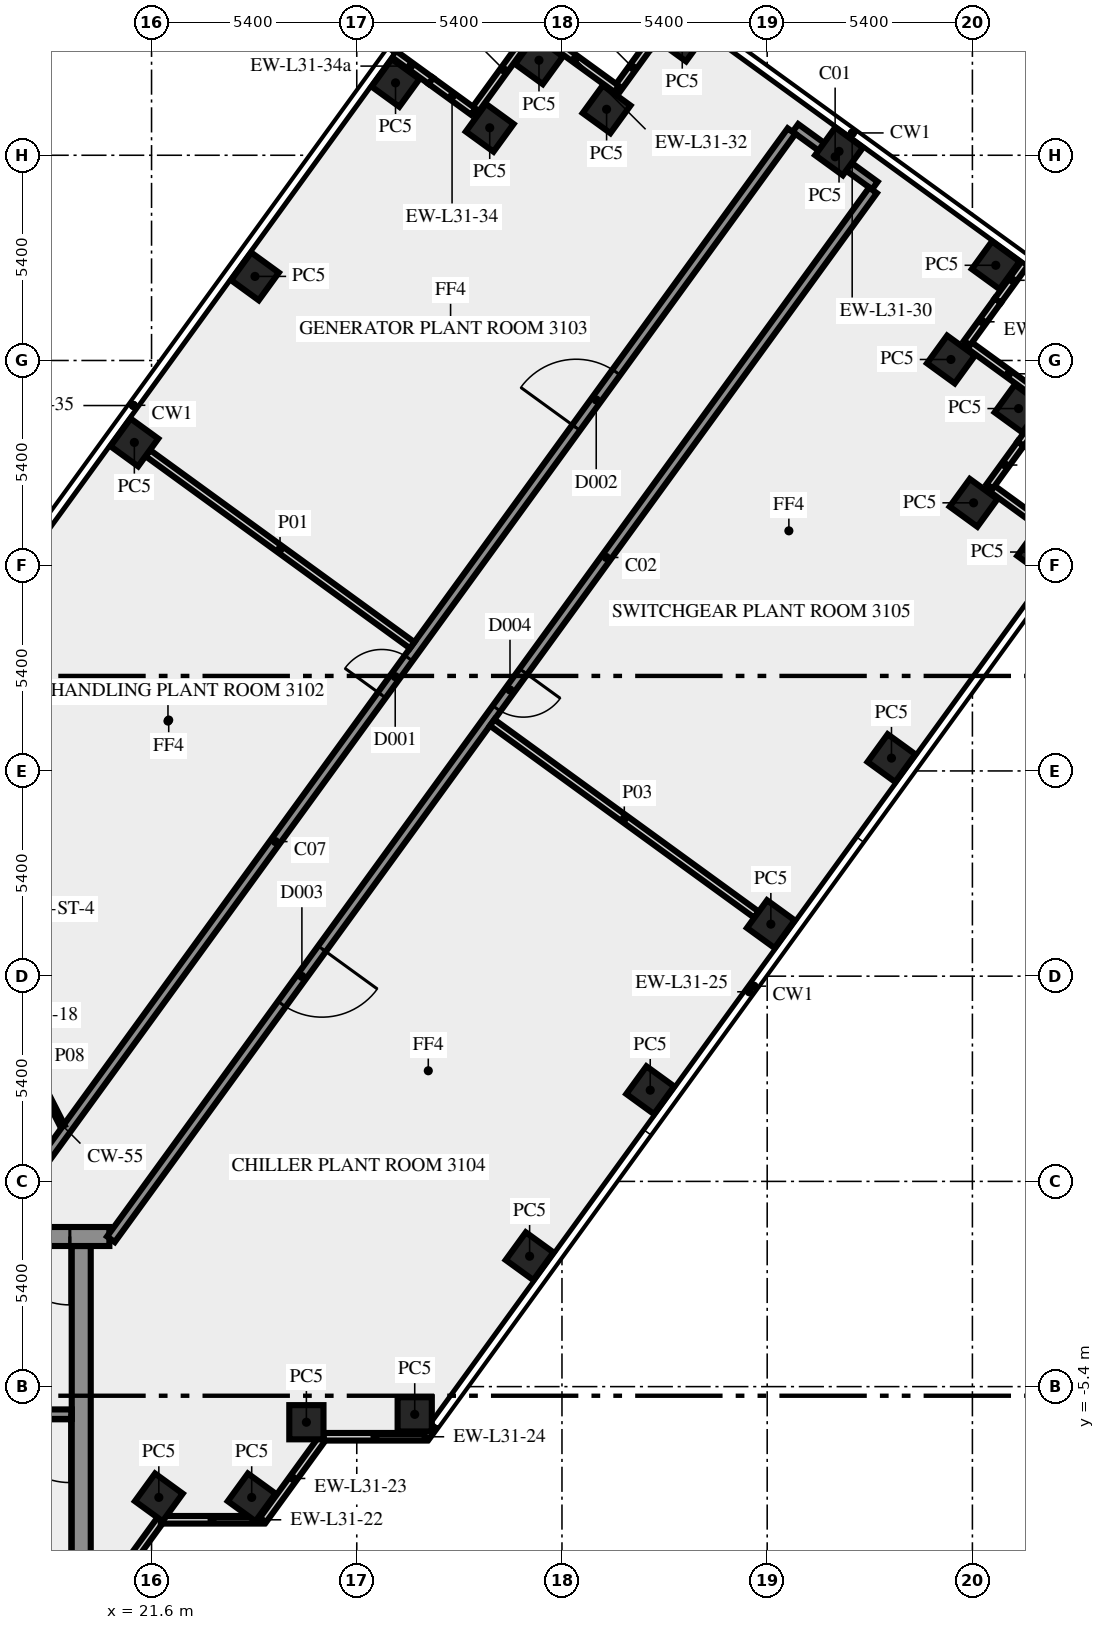
"""IFC4 building model, lengths in metres.
Left out: names, types, materials, properties, quantities, classifications, styles, units other than length and angle.
Written with IfcOpenShell. Run it as: python <this file> out.ifc"""

import sys

from ifc_helpers import new_model, si_unit, direction, frame, frame_2d, origin, origin_2d, place, context, subcontext, project, spatial, rectangle, extrude, element, fill, save


model = new_model("IFC4")
c1 = context("Model", 3, precision=1e-05, world=origin(), true_north=direction((0.0, 1.0)))
c2 = subcontext(c1, "Body", "Model", "MODEL_VIEW")
j1 = project(units=[si_unit("LENGTHUNIT", "METRE"), si_unit("PLANEANGLEUNIT", "RADIAN")], contexts=[c1])
p1 = place(None, origin())
s1 = spatial("IfcSite", under=j1, at=p1, CompositionType="ELEMENT")
p2 = place(p1, origin())
s2 = spatial("IfcBuilding", under=s1, at=p2, CompositionType="ELEMENT")
p3 = place(p2, frame((0.0, 0.0, 133.0)))
s3 = spatial("IfcBuildingStorey", under=s2, at=p3, CompositionType="ELEMENT", Elevation=133.0)
for number, where, z_axis, x_axis in (
    (1, (21.792, -8.315, 0.0), (0.0, 0.0, 1.0), (0.588, 0.809, 0.0)),
    (2, (24.235, -8.315, 0.0), (0.0, 0.0, 1.0), (0.588, 0.809, 0.0)),
    (3, (25.674, -6.337, 0.0), (0.0, 0.0, 1.0), (1.0, 0.0, 0.0)),
    (4, (28.525, -6.13, 0.0), (0.0, 0.0, 1.0), (1.0, 0.0, 0.0)),
    (5, (31.548, -1.969, 0.0), (0.0, 0.0, 1.0), (0.588, 0.809, 0.0)),
    (6, (34.722, 2.4, 0.0), (0.0, 0.0, 1.0), (0.588, 0.809, 0.0)),
    (7, (37.896, 6.769, 0.0), (0.0, 0.0, 1.0), (0.588, 0.809, 0.0)),
    (8, (41.07, 11.137, 0.0), (0.0, 0.0, 1.0), (0.588, 0.809, 0.0)),
    (9, (45.01, 16.56, 0.0), (0.0, 0.0, 1.0), (0.588, 0.809, 0.0)),
    (10, (43.231, 17.854, 0.0), (0.0, 0.0, 1.0), (0.588, 0.809, 0.0)),
    (11, (44.415, 20.335, 0.0), (0.0, 0.0, 1.0), (0.588, 0.809, 0.0)),
    (12, (42.635, 21.626, 0.0), (0.0, 0.0, 1.0), (-0.809, 0.588, 0.0)),
    (13, (43.815, 24.105, 0.0), (0.0, 0.0, 1.0), (-0.809, 0.588, 0.0)),
    (14, (39.691, 27.102, 0.0), (0.0, 0.0, 1.0), (-0.809, 0.588, 0.0)),
    (15, (35.565, 30.1, 0.0), (0.0, 0.0, 1.0), (-0.588, -0.809, 0.0)),
    (16, (33.574, 28.209, 0.0), (0.0, 0.0, 1.0), (-0.809, 0.588, 0.0)),
    (17, (31.795, 29.5, 0.0), (0.0, 0.0, 1.0), (-0.588, -0.809, 0.0)),
    (18, (30.499, 27.723, 0.0), (0.0, 0.0, 1.0), (-0.809, 0.588, 0.0)),
    (19, (28.02, 28.905, 0.0), (0.0, 0.0, 1.0), (-0.809, 0.588, 0.0)),
    (20, (24.321, 23.812, 0.0), (0.0, 0.0, 1.0), (-0.588, -0.809, 0.0)),
    (21, (21.147, 19.444, 0.0), (0.0, 0.0, 1.0), (-0.588, -0.809, 0.0)),
):
    element("IfcColumn", number, at=place(p3, frame(where, z_axis=z_axis, x_axis=x_axis)), inside=s3, PredefinedType="COLUMN", context=c2, shape_type="SweptSolid", body=[
        extrude(rectangle(XDim=0.9, YDim=0.9, at=origin_2d()), origin(), (0.0, 0.0, 1.0), 5.6),
    ])
p4 = place(p3, frame((20.253, -11.083, 0.0), z_axis=(0.0, 0.0, 1.0), x_axis=(0.587766567315, 0.809030569476, 0.0)))
e22 = element("IfcWall", 22, at=p4, inside=s3, PredefinedType="SOLIDWALL", context=c2, shape_type="SweptSolid", body=[
    extrude(rectangle(XDim=2.688, YDim=0.2, at=frame_2d((1.344, 0.0))), origin(), (0.0, 0.0, 1.0), 5.6),
])
p5 = place(p3, frame((21.843, -8.904, 0.0), z_axis=(0.0, 0.0, 1.0), x_axis=(1.0, 0.0, 0.0)))
e23 = element("IfcWall", 23, at=p5, inside=s3, PredefinedType="SOLIDWALL", context=c2, shape_type="SweptSolid", body=[
    extrude(rectangle(XDim=2.7, YDim=0.2, at=frame_2d((1.35, 0.0))), origin(), (0.0, 0.0, 1.0), 5.6),
])
p6 = place(p3, frame((24.533, -8.909, 0.0), z_axis=(0.0, 0.0, 1.0), x_axis=(0.587720002413, 0.809064397168, 0.0)))
e24 = element("IfcWall", 24, at=p6, inside=s3, PredefinedType="SOLIDWALL", context=c2, shape_type="SweptSolid", body=[
    extrude(rectangle(XDim=2.7, YDim=0.2, at=frame_2d((1.35, 0.0))), origin(), (0.0, 0.0, 1.0), 5.6),
])
p7 = place(p3, frame((26.13, -6.719, 0.0), z_axis=(0.0, 0.0, 1.0), x_axis=(1.0, 0.0, 0.0)))
e25 = element("IfcWall", 25, at=p7, inside=s3, PredefinedType="SOLIDWALL", context=c2, shape_type="SweptSolid", body=[
    extrude(rectangle(XDim=2.7, YDim=0.2, at=frame_2d((1.35, 0.0))), origin(), (0.0, 0.0, 1.0), 5.6),
])
p8 = place(p3, frame((28.82, -6.724, 0.0), z_axis=(0.0, 0.0, 1.0), x_axis=(0.587788110303, 0.809014917901, 0.0)))
e26 = element("IfcWall", 26, at=p8, inside=s3, PredefinedType="SOLIDWALL", context=c2, shape_type="SweptSolid", body=[
    extrude(rectangle(XDim=28.956, YDim=0.2, at=frame_2d((14.478, 0.0))), origin(), (0.0, 0.0, 1.0), 5.6),
])
p9 = place(p3, frame((45.842, 16.685, 0.0), z_axis=(0.0, 0.0, 1.0), x_axis=(-0.808958916286, 0.58786518162, 0.0)))
e27 = element("IfcWall", 27, at=p9, inside=s3, PredefinedType="SOLIDWALL", context=c2, shape_type="SweptSolid", body=[
    extrude(rectangle(XDim=2.7, YDim=0.2, at=frame_2d((1.35, 0.0))), origin(), (0.0, 0.0, 1.0), 5.6),
])
p10 = place(p3, frame((43.656, 18.289, 0.0), z_axis=(0.0, 0.0, 1.0), x_axis=(0.58786788786, 0.808956949672, 0.0)))
e28 = element("IfcWall", 28, at=p10, inside=s3, PredefinedType="SOLIDWALL", context=c2, shape_type="SweptSolid", body=[
    extrude(rectangle(XDim=1.386, YDim=0.2, at=frame_2d((0.693, 0.0))), origin(), (0.0, 0.0, 1.0), 4.1),
])
p11 = place(p3, frame((44.47, 19.41, 0.0), z_axis=(0.0, 0.0, 1.0), x_axis=(0.587652369972, 0.809113522361, 0.0)))
e29 = element("IfcWall", 29, at=p11, inside=s3, PredefinedType="SOLIDWALL", context=c2, shape_type="SweptSolid", body=[
    extrude(rectangle(XDim=1.314, YDim=0.2, at=frame_2d((0.657, 0.0))), origin(), (0.0, 0.0, 1.0), 5.6),
])
p12 = place(p3, frame((45.245, 20.456, 0.0), z_axis=(0.0, 0.0, 1.0), x_axis=(-0.809033161865, 0.587762999008, 0.0)))
e30 = element("IfcWall", 30, at=p12, inside=s3, PredefinedType="SOLIDWALL", context=c2, shape_type="SweptSolid", body=[
    extrude(rectangle(XDim=2.7, YDim=0.2, at=frame_2d((1.35, 0.0))), origin(), (0.0, 0.0, 1.0), 5.6),
])
p13 = place(p3, frame((43.058, 22.06, 0.0), z_axis=(0.0, 0.0, 1.0), x_axis=(0.587845576324, 0.808973162964, 0.0)))
e31 = element("IfcWall", 31, at=p13, inside=s3, PredefinedType="SOLIDWALL", context=c2, shape_type="SweptSolid", body=[
    extrude(rectangle(XDim=1.38, YDim=0.2, at=frame_2d((0.69, 0.0))), origin(), (0.0, 0.0, 1.0), 4.1),
])
p14 = place(p3, frame((43.869, 23.176, 0.0), z_axis=(0.0, 0.0, 1.0), x_axis=(0.587797718958, 0.809007936665, 0.0)))
e32 = element("IfcWall", 32, at=p14, inside=s3, PredefinedType="SOLIDWALL", context=c2, shape_type="SweptSolid", body=[
    extrude(rectangle(XDim=1.32, YDim=0.2, at=frame_2d((0.66, 0.0))), origin(), (0.0, 0.0, 1.0), 5.6),
])
p15 = place(p3, frame((44.648, 24.227, 0.0), z_axis=(0.0, 0.0, 1.0), x_axis=(-0.809005491952, 0.587801083694, 0.0)))
e33 = element("IfcWall", 33, at=p15, inside=s3, PredefinedType="SOLIDWALL", context=c2, shape_type="SweptSolid", body=[
    extrude(rectangle(XDim=11.4, YDim=0.2, at=frame_2d((5.7, 0.0))), origin(), (0.0, 0.0, 1.0), 5.6),
])
p16 = place(p3, frame((34.67, 29.868, 0.0), z_axis=(0.0, 0.0, 1.0), x_axis=(-0.587847138415, -0.808972027858, 0.0)))
e34 = element("IfcWall", 34, at=p16, inside=s3, PredefinedType="SOLIDWALL", context=c2, shape_type="SweptSolid", body=[
    extrude(rectangle(XDim=1.387, YDim=0.2, at=frame_2d((0.693, 0.0))), origin(), (0.0, 0.0, 1.0), 4.1),
])
for number, where, z_axis, x_axis in (
    (35, (33.838, 28.744, 0.0), (0.0, 0.0, 1.0), (-0.809, 0.588, 0.0)),
    (36, (31.67, 30.333, 0.0), (0.0, 0.0, 1.0), (-0.588, -0.809, 0.0)),
):
    element("IfcWall", number, at=place(p3, frame(where, z_axis=z_axis, x_axis=x_axis)), inside=s3, PredefinedType="SOLIDWALL", context=c2, shape_type="SweptSolid", body=[
        extrude(rectangle(XDim=2.7, YDim=0.2, at=frame_2d((1.35, 0.0))), origin(), (0.0, 0.0, 1.0), 5.6),
    ])
p17 = place(p3, frame((30.067, 28.146, 0.0), z_axis=(0.0, 0.0, 1.0), x_axis=(-0.809003403559, 0.587803957991, 0.0)))
e37 = element("IfcWall", 37, at=p17, inside=s3, PredefinedType="SOLIDWALL", context=c2, shape_type="SweptSolid", body=[
    extrude(rectangle(XDim=1.382, YDim=0.2, at=frame_2d((0.691, 0.0))), origin(), (0.0, 0.0, 1.0), 4.1),
])
p18 = place(p3, frame((28.949, 28.959, 0.0), z_axis=(0.0, 0.0, 1.0), x_axis=(-0.809064357795, 0.587720056613, 0.0)))
e38 = element("IfcWall", 38, at=p18, inside=s3, PredefinedType="SOLIDWALL", context=c2, shape_type="SweptSolid", body=[
    extrude(rectangle(XDim=1.318, YDim=0.2, at=frame_2d((0.659, 0.0))), origin(), (0.0, 0.0, 1.0), 5.6),
])
p19 = place(p3, frame((27.899, 29.736, 0.0), z_axis=(0.0, 0.0, 1.0), x_axis=(-0.587790518608, -0.809013168147, 0.0)))
e39 = element("IfcWall", 39, at=p19, inside=s3, PredefinedType="SOLIDWALL", context=c2, shape_type="SweptSolid", body=[
    extrude(rectangle(XDim=23.044, YDim=0.2, at=frame_2d((11.522, 0.0))), origin(), (0.0, 0.0, 1.0), 5.6),
])
p20 = place(p3, frame((19.75, -10.5, 0.0), z_axis=(0.0, 0.0, 1.0), x_axis=(0.0, 1.0, 0.0)))
e40 = element("IfcWall", 40, at=p20, inside=s3, PredefinedType="SHEAR", context=c2, shape_type="SweptSolid", body=[
    extrude(rectangle(XDim=8.8, YDim=0.5, at=frame_2d((4.4, 0.0))), origin(), (0.0, 0.0, 1.0), 5.6),
])
p21 = place(p3, frame((19.5, -6.125, 0.0), z_axis=(0.0, 0.0, 1.0), x_axis=(-1.0, 0.0, 0.0)))
e41 = element("IfcWall", 41, at=p21, inside=s3, PredefinedType="SHEAR", context=c2, shape_type="SweptSolid", body=[
    extrude(rectangle(XDim=8.05, YDim=0.25, at=frame_2d((4.025, 0.0))), origin(), (0.0, 0.0, 1.0), 5.6),
])
p22 = place(p21, frame((0.05, 0.0, 0.0)))
e42 = element("IfcOpeningElement", 42, at=p22, cuts=e41, PredefinedType="OPENING", context=c2, shape_type="SweptSolid", body=[
    extrude(rectangle(XDim=1.8, YDim=2.1, at=frame_2d((0.9, 1.05))), frame((0.0, 0.135, 0.0), z_axis=(0.0, -1.0, 0.0), x_axis=(1.0, 0.0, 0.0)), (0.0, 0.0, 1.0), 0.27),
])
p23 = place(p3, frame((20.49, -1.45, 0.0), z_axis=(0.0, 0.0, 1.0), x_axis=(-1.0, 0.0, 0.0)))
e43 = element("IfcWall", 43, at=p23, inside=s3, PredefinedType="SHEAR", context=c2, shape_type="SweptSolid", body=[
    extrude(rectangle(XDim=40.98, YDim=0.5, at=frame_2d((20.49, 0.0))), origin(), (0.0, 0.0, 1.0), 5.6),
])
p24 = place(p23, frame((38.14, 0.0, 0.0)))
e44 = element("IfcOpeningElement", 44, at=p24, cuts=e43, PredefinedType="OPENING", context=c2, shape_type="SweptSolid", body=[
    extrude(rectangle(XDim=1.8, YDim=2.1, at=frame_2d((0.9, 1.05))), frame((0.0, 0.26, 0.0), z_axis=(0.0, -1.0, 0.0), x_axis=(1.0, 0.0, 0.0)), (0.0, 0.0, 1.0), 0.52),
])
p25 = place(p23, frame((35.89, 0.0, 0.0)))
e45 = element("IfcOpeningElement", 45, at=p25, cuts=e43, PredefinedType="OPENING", context=c2, shape_type="SweptSolid", body=[
    extrude(rectangle(XDim=0.9, YDim=2.1, at=frame_2d((0.45, 1.05))), frame((0.0, 0.26, 0.0), z_axis=(0.0, -1.0, 0.0), x_axis=(1.0, 0.0, 0.0)), (0.0, 0.0, 1.0), 0.52),
])
p26 = place(p23, frame((32.94, 0.0, 0.0)))
e46 = element("IfcOpeningElement", 46, at=p26, cuts=e43, PredefinedType="OPENING", context=c2, shape_type="SweptSolid", body=[
    extrude(rectangle(XDim=0.9, YDim=2.1, at=frame_2d((0.45, 1.05))), frame((0.0, 0.26, 0.0), z_axis=(0.0, -1.0, 0.0), x_axis=(1.0, 0.0, 0.0)), (0.0, 0.0, 1.0), 0.52),
])
p27 = place(p23, frame((19.59, 0.0, 0.0)))
e47 = element("IfcOpeningElement", 47, at=p27, cuts=e43, PredefinedType="OPENING", context=c2, shape_type="SweptSolid", body=[
    extrude(rectangle(XDim=2.0, YDim=2.1, at=frame_2d((1.0, 1.05))), frame((0.0, 0.26, 0.0), z_axis=(0.0, -1.0, 0.0), x_axis=(1.0, 0.0, 0.0)), (0.0, 0.0, 1.0), 0.52),
])
p28 = place(p23, frame((7.14, 0.0, 0.0)))
e48 = element("IfcOpeningElement", 48, at=p28, cuts=e43, PredefinedType="OPENING", context=c2, shape_type="SweptSolid", body=[
    extrude(rectangle(XDim=0.9, YDim=2.1, at=frame_2d((0.45, 1.05))), frame((0.0, 0.26, 0.0), z_axis=(0.0, -1.0, 0.0), x_axis=(1.0, 0.0, 0.0)), (0.0, 0.0, 1.0), 0.52),
])
p29 = place(p23, frame((5.028, 0.0, 0.0)))
e49 = element("IfcOpeningElement", 49, at=p29, cuts=e43, PredefinedType="OPENING", context=c2, shape_type="SweptSolid", body=[
    extrude(rectangle(XDim=0.8, YDim=2.1, at=frame_2d((0.4, 1.05))), frame((0.0, 0.26, 0.0), z_axis=(0.0, -1.0, 0.0), x_axis=(1.0, 0.0, 0.0)), (0.0, 0.0, 1.0), 0.52),
])
p30 = place(p23, frame((3.452, 0.0, 0.0)))
e50 = element("IfcOpeningElement", 50, at=p30, cuts=e43, PredefinedType="OPENING", context=c2, shape_type="SweptSolid", body=[
    extrude(rectangle(XDim=0.8, YDim=2.1, at=frame_2d((0.4, 1.05))), frame((0.0, 0.26, 0.0), z_axis=(0.0, -1.0, 0.0), x_axis=(1.0, 0.0, 0.0)), (0.0, 0.0, 1.0), 0.52),
])
p31 = place(p23, frame((1.04, 0.0, 0.0)))
e51 = element("IfcOpeningElement", 51, at=p31, cuts=e43, PredefinedType="OPENING", context=c2, shape_type="SweptSolid", body=[
    extrude(rectangle(XDim=1.8, YDim=2.1, at=frame_2d((0.9, 1.05))), frame((0.0, 0.26, 0.0), z_axis=(0.0, -1.0, 0.0), x_axis=(1.0, 0.0, 0.0)), (0.0, 0.0, 1.0), 0.52),
])
p32 = place(p3, frame((38.543, 27.719, 0.0), z_axis=(0.0, 0.0, 1.0), x_axis=(0.809038456977, -0.58775571042, 0.0)))
e52 = element("IfcWall", 52, at=p32, inside=s3, PredefinedType="SOLIDWALL", context=c2, shape_type="SweptSolid", body=[
    extrude(rectangle(XDim=2.583, YDim=0.25, at=frame_2d((1.292, 0.0))), origin(), (0.0, 0.0, 1.0), 5.6),
])
p33 = place(p3, frame((40.584, 26.078, 0.0), z_axis=(0.0, 0.0, 1.0), x_axis=(-0.587782727964, -0.809018828401, 0.0)))
e53 = element("IfcWall", 53, at=p33, inside=s3, PredefinedType="SOLIDWALL", context=c2, shape_type="SweptSolid", body=[
    extrude(rectangle(XDim=34.117, YDim=0.25, at=frame_2d((17.058, 0.0))), origin(), (0.0, 0.0, 1.0), 5.6),
])
p34 = place(p33, frame((24.667, 0.0, 0.0)))
e54 = element("IfcOpeningElement", 54, at=p34, cuts=e53, PredefinedType="OPENING", context=c2, shape_type="SweptSolid", body=[
    extrude(rectangle(XDim=1.8, YDim=2.1, at=frame_2d((0.9, 1.05))), frame((0.0, 0.135, 0.0), z_axis=(0.0, -1.0, 0.0), x_axis=(1.0, 0.0, 0.0)), (0.0, 0.0, 1.0), 0.27),
])
p35 = place(p33, frame((15.651, 0.0, 0.0)))
e55 = element("IfcOpeningElement", 55, at=p35, cuts=e53, PredefinedType="OPENING", context=c2, shape_type="SweptSolid", body=[
    extrude(rectangle(XDim=1.2, YDim=2.1, at=frame_2d((0.6, 1.05))), frame((0.0, 0.135, 0.0), z_axis=(0.0, -1.0, 0.0), x_axis=(1.0, 0.0, 0.0)), (0.0, 0.0, 1.0), 0.27),
])
p36 = place(p3, frame((17.545, -1.125, 0.0), z_axis=(0.0, 0.0, 1.0), x_axis=(0.587787785895, 0.809015153599, 0.0)))
e56 = element("IfcWall", 56, at=p36, inside=s3, PredefinedType="SOLIDWALL", context=c2, shape_type="SweptSolid", body=[
    extrude(rectangle(XDim=35.549, YDim=0.25, at=frame_2d((17.775, 0.0))), origin(), (0.0, 0.0, 1.0), 5.6),
])
p37 = place(p36, frame((17.207, 0.0, 0.0)))
e57 = element("IfcOpeningElement", 57, at=p37, cuts=e56, PredefinedType="OPENING", context=c2, shape_type="SweptSolid", body=[
    extrude(rectangle(XDim=1.2, YDim=2.1, at=frame_2d((0.6, 1.05))), frame((0.0, 0.135, 0.0), z_axis=(0.0, -1.0, 0.0), x_axis=(1.0, 0.0, 0.0)), (0.0, 0.0, 1.0), 0.27),
])
p38 = place(p36, frame((25.906, 0.0, 0.0)))
e58 = element("IfcOpeningElement", 58, at=p38, cuts=e56, PredefinedType="OPENING", context=c2, shape_type="SweptSolid", body=[
    extrude(rectangle(XDim=1.8, YDim=2.1, at=frame_2d((0.9, 1.05))), frame((0.0, 0.135, 0.0), z_axis=(0.0, -1.0, 0.0), x_axis=(1.0, 0.0, 0.0)), (0.0, 0.0, 1.0), 0.27),
])
p39 = place(p3, frame((28.457, 14.108, 0.0), z_axis=(0.0, 0.0, 1.0), x_axis=(-0.808985356091, 0.58782879619, 0.0)))
e59 = element("IfcWall", 59, at=p39, inside=s3, PredefinedType="SOLIDWALL", context=c2, shape_type="SweptSolid", body=[
    extrude(rectangle(XDim=8.595, YDim=0.2, at=frame_2d((4.298, 0.0))), origin(), (0.0, 0.0, 1.0), 5.6),
])
p40 = place(p3, frame((37.516, 7.02, 0.0), z_axis=(0.0, 0.0, 1.0), x_axis=(-0.808979233367, 0.58783722235, 0.0)))
e60 = element("IfcWall", 60, at=p40, inside=s3, PredefinedType="SOLIDWALL", context=c2, shape_type="SweptSolid", body=[
    extrude(rectangle(XDim=8.595, YDim=0.2, at=frame_2d((4.297, 0.0))), origin(), (0.0, 0.0, 1.0), 5.6),
])
p41 = place(p3, frame((18.0, 3.925, 0.0), z_axis=(0.0, 0.0, 1.0), x_axis=(0.453950796792, -0.891026752736, 0.0)))
e61 = element("IfcWall", 61, at=p41, inside=s3, PredefinedType="PARTITIONING", context=c2, shape_type="SweptSolid", body=[
    extrude(rectangle(XDim=2.778, YDim=0.12, at=frame_2d((1.389, 0.0))), origin(), (0.0, 0.0, 1.0), 5.6),
])
p42 = place(p22, origin())
e62 = element("IfcDoor", 62, at=p42, inside=s3, OperationType="DOUBLE_DOOR_SINGLE_SWING", PredefinedType="DOOR", context=c2, shape_type="SweptSolid", body=[
    extrude(rectangle(XDim=1.8, YDim=2.1, at=frame_2d((0.9, 1.05))), frame((0.0, 0.025, 0.0), z_axis=(0.0, -1.0, 0.0), x_axis=(1.0, 0.0, 0.0)), (0.0, 0.0, 1.0), 0.05),
])
fill(e42, e62)
p43 = place(p31, origin())
e63 = element("IfcDoor", 63, at=p43, inside=s3, OperationType="DOUBLE_DOOR_SINGLE_SWING", PredefinedType="DOOR", context=c2, shape_type="SweptSolid", body=[
    extrude(rectangle(XDim=1.8, YDim=2.1, at=frame_2d((0.9, 1.05))), frame((0.0, 0.025, 0.0), z_axis=(0.0, -1.0, 0.0), x_axis=(1.0, 0.0, 0.0)), (0.0, 0.0, 1.0), 0.05),
])
fill(e51, e63)
p44 = place(p37, origin())
e64 = element("IfcDoor", 64, at=p44, inside=s3, OperationType="SINGLE_SWING_RIGHT", PredefinedType="DOOR", context=c2, shape_type="SweptSolid", body=[
    extrude(rectangle(XDim=1.2, YDim=2.1, at=frame_2d((0.6, 1.05))), frame((0.0, 0.025, 0.0), z_axis=(0.0, -1.0, 0.0), x_axis=(1.0, 0.0, 0.0)), (0.0, 0.0, 1.0), 0.05),
])
fill(e57, e64)
p45 = place(p34, origin())
e65 = element("IfcDoor", 65, at=p45, inside=s3, OperationType="DOUBLE_DOOR_SINGLE_SWING", PredefinedType="DOOR", context=c2, shape_type="SweptSolid", body=[
    extrude(rectangle(XDim=1.8, YDim=2.1, at=frame_2d((0.9, 1.05))), frame((0.0, 0.025, 0.0), z_axis=(0.0, -1.0, 0.0), x_axis=(1.0, 0.0, 0.0)), (0.0, 0.0, 1.0), 0.05),
])
fill(e54, e65)
p46 = place(p38, origin())
e66 = element("IfcDoor", 66, at=p46, inside=s3, OperationType="DOUBLE_DOOR_SINGLE_SWING", PredefinedType="DOOR", context=c2, shape_type="SweptSolid", body=[
    extrude(rectangle(XDim=1.8, YDim=2.1, at=frame_2d((0.9, 1.05))), frame((0.0, 0.025, 0.0), z_axis=(0.0, -1.0, 0.0), x_axis=(1.0, 0.0, 0.0)), (0.0, 0.0, 1.0), 0.05),
])
fill(e58, e66)
p47 = place(p35, origin())
e67 = element("IfcDoor", 67, at=p47, inside=s3, OperationType="SINGLE_SWING_RIGHT", PredefinedType="DOOR", context=c2, shape_type="SweptSolid", body=[
    extrude(rectangle(XDim=1.2, YDim=2.1, at=frame_2d((0.6, 1.05))), frame((0.0, 0.025, 0.0), z_axis=(0.0, -1.0, 0.0), x_axis=(1.0, 0.0, 0.0)), (0.0, 0.0, 1.0), 0.05),
])
fill(e55, e67)
save(model, sys.argv[1])
